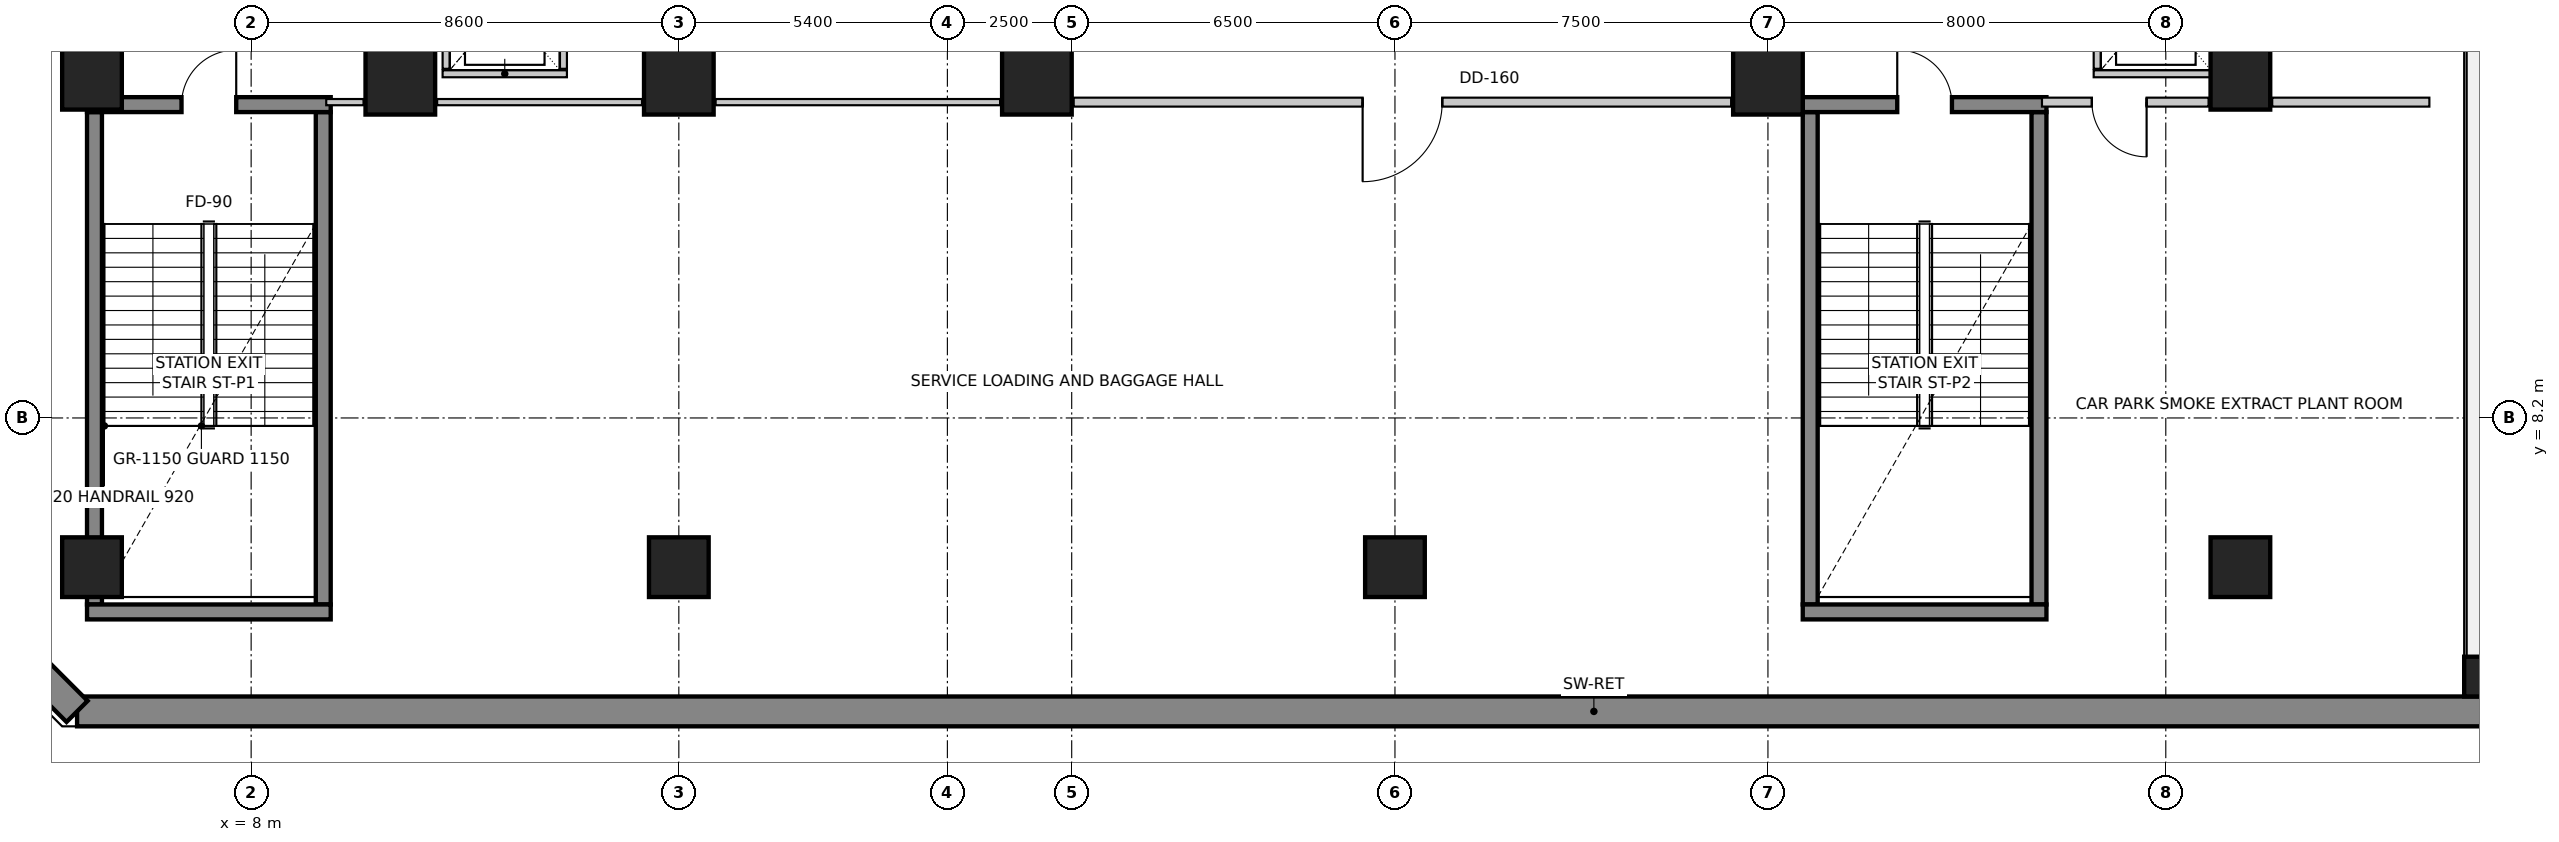
"""IFC4 building model, lengths in metres.
Left out: names, types, materials, properties, quantities, classifications, styles, units other than length and angle.
Written with IfcOpenShell. Run it as: python <this file> out.ifc"""

import sys

from ifc_helpers import new_model, si_unit, direction, frame, frame_2d, origin, origin_2d, place, context, subcontext, project, spatial, rectangle, extrude, source, transform, mapped, element, fill, save


model = new_model("IFC4")
c1 = context("Model", 3, precision=1e-05, world=origin(), true_north=direction((0.0, 1.0)))
c2 = subcontext(c1, "Body", "Model", "MODEL_VIEW")
j1 = project(units=[si_unit("LENGTHUNIT", "METRE"), si_unit("PLANEANGLEUNIT", "RADIAN")], contexts=[c1])
p1 = place(None, origin())
s1 = spatial("IfcSite", under=j1, at=p1, CompositionType="ELEMENT")
p2 = place(p1, origin())
s2 = spatial("IfcBuilding", under=s1, at=p2, CompositionType="ELEMENT")
p3 = place(p2, frame((0.0, 0.0, -5.4)))
s3 = spatial("IfcBuildingStorey", under=s2, at=p3, CompositionType="ELEMENT", Elevation=-5.4)
for number, where, z_axis, x_axis in (
    (1, (4.85, 4.45, 0.0), (0.0, 0.0, 1.0), (0.0, 1.0, 0.0)),
    (2, (9.45, 4.45, 0.0), (0.0, 0.0, 1.0), (0.0, 1.0, 0.0)),
):
    element("IfcWall", number, at=place(p3, frame(where, z_axis=z_axis, x_axis=x_axis)), inside=s3, PredefinedType="SHEAR", context=c2, shape_type="SweptSolid", body=[
        extrude(rectangle(XDim=9.9, YDim=0.3, at=frame_2d((4.95, 0.0))), origin(), (0.0, 0.0, 1.0), 5.4),
    ])
p4 = place(p3, frame((4.7, 4.3, 0.0), z_axis=(0.0, 0.0, 1.0), x_axis=(1.0, 0.0, 0.0)))
e3 = element("IfcWall", 3, at=p4, inside=s3, PredefinedType="SHEAR", context=c2, shape_type="SweptSolid", body=[
    extrude(rectangle(XDim=4.9, YDim=0.3, at=frame_2d((2.45, 0.0))), origin(), (0.0, 0.0, 1.0), 5.4),
])
p5 = place(p3, frame((4.7, 14.5, 0.0), z_axis=(0.0, 0.0, 1.0), x_axis=(1.0, 0.0, 0.0)))
e4 = element("IfcWall", 4, at=p5, inside=s3, PredefinedType="SHEAR", context=c2, shape_type="SweptSolid", body=[
    extrude(rectangle(XDim=4.9, YDim=0.3, at=frame_2d((2.45, 0.0))), origin(), (0.0, 0.0, 1.0), 5.4),
])
m1 = source(origin(), c2, "Body", "SweptSolid", [
    extrude(rectangle(XDim=1.1, YDim=2.15, at=frame_2d((0.55, 1.075))), frame((0.0, 0.16, 0.0), z_axis=(0.0, -1.0, 0.0), x_axis=(1.0, 0.0, 0.0)), (0.0, 0.0, 1.0), 0.32),
])
p6 = place(p5, frame((1.9, 0.0, 0.0)))
e5 = element("IfcOpeningElement", 5, at=p6, cuts=e4, PredefinedType="OPENING", context=c2, shape_type="MappedRepresentation", body=[
    mapped(m1, transform((0.0, 0.0, 0.0), scale=1.0)),
])
for number, where, z_axis, x_axis in (
    (6, (39.35, 4.45, 0.0), (0.0, 0.0, 1.0), (0.0, 1.0, 0.0)),
    (7, (43.95, 4.45, 0.0), (0.0, 0.0, 1.0), (0.0, 1.0, 0.0)),
):
    element("IfcWall", number, at=place(p3, frame(where, z_axis=z_axis, x_axis=x_axis)), inside=s3, PredefinedType="SHEAR", context=c2, shape_type="SweptSolid", body=[
        extrude(rectangle(XDim=9.9, YDim=0.3, at=frame_2d((4.95, 0.0))), origin(), (0.0, 0.0, 1.0), 5.4),
    ])
p7 = place(p3, frame((39.2, 4.3, 0.0), z_axis=(0.0, 0.0, 1.0), x_axis=(1.0, 0.0, 0.0)))
e8 = element("IfcWall", 8, at=p7, inside=s3, PredefinedType="SHEAR", context=c2, shape_type="SweptSolid", body=[
    extrude(rectangle(XDim=4.9, YDim=0.3, at=frame_2d((2.45, 0.0))), origin(), (0.0, 0.0, 1.0), 5.4),
])
p8 = place(p3, frame((39.2, 14.5, 0.0), z_axis=(0.0, 0.0, 1.0), x_axis=(1.0, 0.0, 0.0)))
e9 = element("IfcWall", 9, at=p8, inside=s3, PredefinedType="SHEAR", context=c2, shape_type="SweptSolid", body=[
    extrude(rectangle(XDim=4.9, YDim=0.3, at=frame_2d((2.45, 0.0))), origin(), (0.0, 0.0, 1.0), 5.4),
])
p9 = place(p8, frame((1.9, 0.0, 0.0)))
e10 = element("IfcOpeningElement", 10, at=p9, cuts=e9, PredefinedType="OPENING", context=c2, shape_type="MappedRepresentation", body=[
    mapped(m1, transform((0.0, 0.0, 0.0), scale=1.0)),
])
p10 = place(p3, frame((4.5, 2.3, 0.0), z_axis=(0.0, 0.0, 1.0), x_axis=(1.0, 0.0, 0.0)))
e11 = element("IfcWall", 11, at=p10, inside=s3, PredefinedType="SHEAR", context=c2, shape_type="SweptSolid", body=[
    extrude(rectangle(XDim=61.0, YDim=0.6, at=frame_2d((30.5, 0.0))), origin(), (0.0, 0.0, 1.0), 5.4),
])
p11 = place(p3, frame((2.3, 4.5, 0.0), z_axis=(0.0, 0.0, 1.0), x_axis=(0.707106781187, -0.707106781187, 0.0)))
e12 = element("IfcWall", 12, at=p11, inside=s3, PredefinedType="SHEAR", context=c2, shape_type="SweptSolid", body=[
    extrude(rectangle(XDim=3.111, YDim=0.6, at=frame_2d((1.556, 0.0))), origin(), (0.0, 0.0, 1.0), 5.4),
])
m2 = source(origin(), c2, "Body", "SweptSolid", [
    extrude(rectangle(XDim=1.2, YDim=1.2, at=origin_2d()), origin(), (0.0, 0.0, 1.0), 5.4),
])
for number, where, z_axis, x_axis in (
    (13, (4.8, 5.2, 0.0), (0.0, 0.0, 1.0), (1.0, 0.0, 0.0)),
    (14, (16.6, 5.2, 0.0), (0.0, 0.0, 1.0), (1.0, 0.0, 0.0)),
    (15, (31.0, 5.2, 0.0), (0.0, 0.0, 1.0), (1.0, 0.0, 0.0)),
    (16, (48.0, 5.2, 0.0), (0.0, 0.0, 1.0), (1.0, 0.0, 0.0)),
    (17, (4.8, 15.0, 0.0), (0.0, 0.0, 1.0), (1.0, 0.0, 0.0)),
):
    element("IfcColumn", number, at=place(p3, frame(where, z_axis=z_axis, x_axis=x_axis)), inside=s3, PredefinedType="COLUMN", context=c2, shape_type="MappedRepresentation", body=[
        mapped(m2, transform((0.0, 0.0, 0.0), scale=1.0)),
    ])
m3 = source(origin(), c2, "Body", "SweptSolid", [
    extrude(rectangle(XDim=1.4, YDim=1.4, at=origin_2d()), origin(), (0.0, 0.0, 1.0), 5.4),
])
for number, where, z_axis, x_axis in (
    (18, (11.0, 15.0, 0.0), (0.0, 0.0, 1.0), (1.0, 0.0, 0.0)),
    (19, (16.6, 15.0, 0.0), (0.0, 0.0, 1.0), (1.0, 0.0, 0.0)),
    (20, (23.8, 15.0, 0.0), (0.0, 0.0, 1.0), (1.0, 0.0, 0.0)),
    (21, (38.5, 15.0, 0.0), (0.0, 0.0, 1.0), (1.0, 0.0, 0.0)),
):
    element("IfcColumn", number, at=place(p3, frame(where, z_axis=z_axis, x_axis=x_axis)), inside=s3, PredefinedType="COLUMN", context=c2, shape_type="MappedRepresentation", body=[
        mapped(m3, transform((0.0, 0.0, 0.0), scale=1.0)),
    ])
p12 = place(p3, frame((48.0, 15.0, 0.0), z_axis=(0.0, 0.0, 1.0), x_axis=(1.0, 0.0, 0.0)))
e22 = element("IfcColumn", 22, at=p12, inside=s3, PredefinedType="COLUMN", context=c2, shape_type="MappedRepresentation", body=[
    mapped(m2, transform((0.0, 0.0, 0.0), scale=1.0)),
])
m4 = source(origin(), c2, "Body", "SweptSolid", [
    extrude(rectangle(XDim=0.8, YDim=0.8, at=origin_2d()), origin(), (0.0, 0.0, 1.0), 5.02),
])
p13 = place(p3, frame((52.9, 3.0, 0.0), z_axis=(0.0, 0.0, 1.0), x_axis=(1.0, 0.0, 0.0)))
e23 = element("IfcColumn", 23, at=p13, inside=s3, PredefinedType="COLUMN", context=c2, shape_type="MappedRepresentation", body=[
    mapped(m4, transform((0.0, 0.0, 0.0), scale=1.0)),
])
p14 = place(p3, frame((11.85, 15.12, 0.0), z_axis=(0.0, 0.0, 1.0), x_axis=(1.0, 0.0, 0.0)))
e24 = element("IfcWall", 24, at=p14, inside=s3, PredefinedType="SOLIDWALL", context=c2, shape_type="SweptSolid", body=[
    extrude(rectangle(XDim=2.5, YDim=0.14, at=frame_2d((1.25, 0.0))), origin(), (0.0, 0.0, 1.0), 3.892),
])
for number, where, z_axis, x_axis in (
    (25, (11.92, 15.22, 0.0), (0.0, 0.0, 1.0), (0.0, 1.0, 0.0)),
    (26, (14.28, 15.22, 0.0), (0.0, 0.0, 1.0), (0.0, 1.0, 0.0)),
):
    element("IfcWall", number, at=place(p3, frame(where, z_axis=z_axis, x_axis=x_axis)), inside=s3, PredefinedType="SOLIDWALL", context=c2, shape_type="SweptSolid", body=[
        extrude(rectangle(XDim=2.56, YDim=0.14, at=frame_2d((1.28, 0.0))), origin(), (0.0, 0.0, 1.0), 3.892),
    ])
p15 = place(p3, frame((45.05, 15.12, 0.0), z_axis=(0.0, 0.0, 1.0), x_axis=(1.0, 0.0, 0.0)))
e27 = element("IfcWall", 27, at=p15, inside=s3, PredefinedType="SOLIDWALL", context=c2, shape_type="SweptSolid", body=[
    extrude(rectangle(XDim=2.5, YDim=0.14, at=frame_2d((1.25, 0.0))), origin(), (0.0, 0.0, 1.0), 3.892),
])
p16 = place(p3, frame((45.12, 15.22, 0.0), z_axis=(0.0, 0.0, 1.0), x_axis=(0.0, 1.0, 0.0)))
e28 = element("IfcWall", 28, at=p16, inside=s3, PredefinedType="SOLIDWALL", context=c2, shape_type="SweptSolid", body=[
    extrude(rectangle(XDim=2.56, YDim=0.14, at=frame_2d((1.28, 0.0))), origin(), (0.0, 0.0, 1.0), 3.892),
])
p17 = place(p3, frame((47.48, 15.22, 0.0), z_axis=(0.0, 0.0, 1.0), x_axis=(0.0, 1.0, 0.0)))
e29 = element("IfcWall", 29, at=p17, inside=s3, PredefinedType="SOLIDWALL", context=c2, shape_type="SweptSolid", body=[
    extrude(rectangle(XDim=2.56, YDim=0.14, at=frame_2d((1.28, 0.0))), origin(), (0.0, 0.0, 1.0), 3.292),
])
p18 = place(p3, frame((37.76, 14.55, 0.0), z_axis=(0.0, 0.0, 1.0), x_axis=(-1.0, 0.0, 0.0)))
e30 = element("IfcWall", 30, at=p18, inside=s3, PredefinedType="PARTITIONING", context=c2, shape_type="SweptSolid", body=[
    extrude(rectangle(XDim=13.22, YDim=0.18, at=frame_2d((6.61, 0.0))), origin(), (0.0, 0.0, 1.0), 5.1),
])
m5 = source(origin(), c2, "Body", "SweptSolid", [
    extrude(rectangle(XDim=1.6, YDim=2.15, at=frame_2d((0.8, 1.075))), frame((0.0, 0.1, 0.0), z_axis=(0.0, -1.0, 0.0), x_axis=(1.0, 0.0, 0.0)), (0.0, 0.0, 1.0), 0.2),
])
p19 = place(p18, frame((5.81, 0.0, 0.0)))
e31 = element("IfcOpeningElement", 31, at=p19, cuts=e30, PredefinedType="OPENING", context=c2, shape_type="MappedRepresentation", body=[
    mapped(m5, transform((0.0, 0.0, 0.0), scale=1.0)),
])
p20 = place(p3, frame((23.06, 14.55, 0.0), z_axis=(0.0, 0.0, 1.0), x_axis=(-1.0, 0.0, 0.0)))
e32 = element("IfcWall", 32, at=p20, inside=s3, PredefinedType="PARTITIONING", context=c2, shape_type="SweptSolid", body=[
    extrude(rectangle(XDim=5.72, YDim=0.125, at=frame_2d((2.86, 0.0))), origin(), (0.0, 0.0, 1.0), 5.1),
])
p21 = place(p3, frame((15.86, 14.55, 0.0), z_axis=(0.0, 0.0, 1.0), x_axis=(-1.0, 0.0, 0.0)))
e33 = element("IfcWall", 33, at=p21, inside=s3, PredefinedType="PARTITIONING", context=c2, shape_type="SweptSolid", body=[
    extrude(rectangle(XDim=4.12, YDim=0.125, at=frame_2d((2.06, 0.0))), origin(), (0.0, 0.0, 1.0), 5.1),
])
p22 = place(p3, frame((10.26, 14.55, 0.0), z_axis=(0.0, 0.0, 1.0), x_axis=(-1.0, 0.0, 0.0)))
e34 = element("IfcWall", 34, at=p22, inside=s3, PredefinedType="PARTITIONING", context=c2, shape_type="SweptSolid", body=[
    extrude(rectangle(XDim=0.75, YDim=0.125, at=frame_2d((0.375, 0.0))), origin(), (0.0, 0.0, 1.0), 5.1),
])
p23 = place(p3, frame((47.36, 14.55, 0.0), z_axis=(0.0, 0.0, 1.0), x_axis=(-1.0, 0.0, 0.0)))
e35 = element("IfcWall", 35, at=p23, inside=s3, PredefinedType="PARTITIONING", context=c2, shape_type="SweptSolid", body=[
    extrude(rectangle(XDim=3.35, YDim=0.18, at=frame_2d((1.675, 0.0))), origin(), (0.0, 0.0, 1.0), 5.1),
])
m6 = source(origin(), c2, "Body", "SweptSolid", [
    extrude(rectangle(XDim=1.1, YDim=2.15, at=frame_2d((0.55, 1.075))), frame((0.0, 0.1, 0.0), z_axis=(0.0, -1.0, 0.0), x_axis=(1.0, 0.0, 0.0)), (0.0, 0.0, 1.0), 0.2),
])
p24 = place(p23, frame((1.246, 0.0, 0.0)))
e36 = element("IfcOpeningElement", 36, at=p24, cuts=e35, PredefinedType="OPENING", context=c2, shape_type="MappedRepresentation", body=[
    mapped(m6, transform((0.0, 0.0, 0.0), scale=1.0)),
])
p25 = place(p3, frame((51.8, 14.55, 0.0), z_axis=(0.0, 0.0, 1.0), x_axis=(-1.0, 0.0, 0.0)))
e37 = element("IfcWall", 37, at=p25, inside=s3, PredefinedType="PARTITIONING", context=c2, shape_type="SweptSolid", body=[
    extrude(rectangle(XDim=3.16, YDim=0.18, at=frame_2d((1.58, 0.0))), origin(), (0.0, 0.0, 1.0), 5.1),
])
m7 = source(origin(), c2, "Body", "SweptSolid", [
    extrude(rectangle(XDim=1.1, YDim=2.15, at=frame_2d((0.55, 1.075))), frame((0.0, 0.025, 0.0), z_axis=(0.0, -1.0, 0.0), x_axis=(1.0, 0.0, 0.0)), (0.0, 0.0, 1.0), 0.05),
])
p26 = place(p6, origin())
e38 = element("IfcDoor", 38, at=p26, inside=s3, OperationType="SINGLE_SWING_RIGHT", PredefinedType="DOOR", context=c2, shape_type="MappedRepresentation", body=[
    mapped(m7, transform((0.0, 0.0, 0.0), scale=1.0)),
])
fill(e5, e38)
p27 = place(p9, origin())
e39 = element("IfcDoor", 39, at=p27, inside=s3, OperationType="SINGLE_SWING_LEFT", PredefinedType="DOOR", context=c2, shape_type="MappedRepresentation", body=[
    mapped(m7, transform((0.0, 0.0, 0.0), scale=1.0)),
])
fill(e10, e39)
m8 = source(origin(), c2, "Body", "SweptSolid", [
    extrude(rectangle(XDim=1.6, YDim=2.15, at=frame_2d((0.8, 1.075))), frame((0.0, 0.025, 0.0), z_axis=(0.0, -1.0, 0.0), x_axis=(1.0, 0.0, 0.0)), (0.0, 0.0, 1.0), 0.05),
])
p28 = place(p19, origin())
e40 = element("IfcDoor", 40, at=p28, inside=s3, OperationType="SINGLE_SWING_RIGHT", PredefinedType="DOOR", context=c2, shape_type="MappedRepresentation", body=[
    mapped(m8, transform((0.0, 0.0, 0.0), scale=1.0)),
])
fill(e31, e40)
p29 = place(p24, origin())
e41 = element("IfcDoor", 41, at=p29, inside=s3, OperationType="SINGLE_SWING_LEFT", PredefinedType="DOOR", context=c2, shape_type="MappedRepresentation", body=[
    mapped(m7, transform((0.0, 0.0, 0.0), scale=1.0)),
])
fill(e36, e41)
save(model, sys.argv[1])
